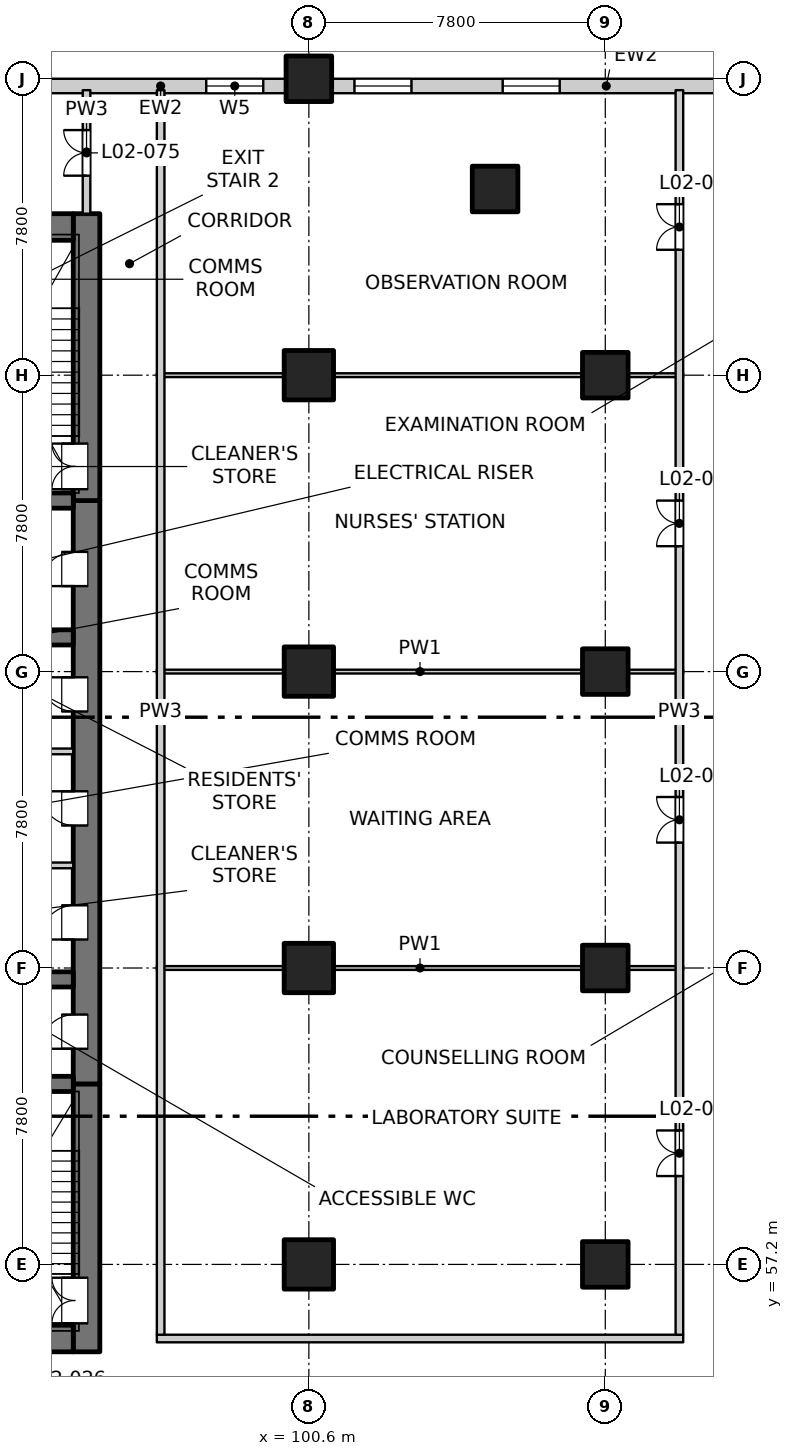
"""IFC4 building model, lengths in metres.
Left out: names, types, materials, properties, quantities, classifications, styles, units other than length and angle.
Written with IfcOpenShell. Run it as: python <this file> out.ifc"""

import sys

from ifc_helpers import new_model, si_unit, direction, frame, frame_2d, origin, origin_2d, place, context, subcontext, project, spatial, rectangle, extrude, element, fill, save


model = new_model("IFC4")
c1 = context("Model", 3, precision=1e-05, world=origin(), true_north=direction((0.0, 1.0)))
c2 = subcontext(c1, "Body", "Model", "MODEL_VIEW")
j1 = project(units=[si_unit("LENGTHUNIT", "METRE"), si_unit("PLANEANGLEUNIT", "RADIAN")], contexts=[c1])
p1 = place(None, origin())
s1 = spatial("IfcSite", under=j1, at=p1, CompositionType="ELEMENT")
p2 = place(p1, origin())
s2 = spatial("IfcBuilding", under=s1, at=p2, CompositionType="ELEMENT")
p3 = place(p2, frame((0.0, 0.0, 10.5)))
s3 = spatial("IfcBuildingStorey", under=s2, at=p3, CompositionType="ELEMENT", Elevation=10.5)
for number, where, z_axis, x_axis in (
    (1, (105.5, 85.5, -0.3), (0.0, 0.0, 1.0), (1.0, 0.0, 0.0)),
    (2, (108.4, 57.2, -0.3), (0.0, 0.0, 1.0), (1.0, 0.0, 0.0)),
    (3, (108.4, 65.0, -0.3), (0.0, 0.0, 1.0), (1.0, 0.0, 0.0)),
    (4, (108.4, 72.8, -0.3), (0.0, 0.0, 1.0), (1.0, 0.0, 0.0)),
    (5, (108.4, 80.6, -0.3), (0.0, 0.0, 1.0), (1.0, 0.0, 0.0)),
    (6, (100.6, 88.4, -0.3), (0.0, 0.0, 1.0), (1.0, 0.0, 0.0)),
):
    element("IfcColumn", number, at=place(p3, frame(where, z_axis=z_axis, x_axis=x_axis)), inside=s3, PredefinedType="COLUMN", context=c2, shape_type="SweptSolid", body=[
        extrude(rectangle(XDim=1.2, YDim=1.2, at=origin_2d()), origin(), (0.0, 0.0, 1.0), 4.45),
    ])
for number, where, z_axis, x_axis in (
    (7, (100.6, 57.2, -0.3), (0.0, 0.0, 1.0), (1.0, 0.0, 0.0)),
    (8, (100.6, 65.0, -0.3), (0.0, 0.0, 1.0), (1.0, 0.0, 0.0)),
    (9, (100.6, 72.8, -0.3), (0.0, 0.0, 1.0), (1.0, 0.0, 0.0)),
    (10, (100.6, 80.6, -0.3), (0.0, 0.0, 1.0), (1.0, 0.0, 0.0)),
):
    element("IfcColumn", number, at=place(p3, frame(where, z_axis=z_axis, x_axis=x_axis)), inside=s3, PredefinedType="COLUMN", context=c2, shape_type="SweptSolid", body=[
        extrude(rectangle(XDim=1.3, YDim=1.3, at=origin_2d()), origin(), (0.0, 0.0, 1.0), 4.45),
    ])
p4 = place(p3, frame((94.75, 54.9, -0.3), z_axis=(0.0, 0.0, 1.0), x_axis=(0.0, 1.0, 0.0)))
e11 = element("IfcWall", 11, at=p4, inside=s3, PredefinedType="SOLIDWALL", context=c2, shape_type="SweptSolid", body=[
    extrude(rectangle(XDim=7.05, YDim=0.7, at=frame_2d((3.525, 0.0))), origin(), (0.0, 0.0, 1.0), 4.45),
])
p5 = place(p4, frame((0.75, 0.0, 0.3)))
e12 = element("IfcOpeningElement", 12, at=p5, cuts=e11, PredefinedType="OPENING", context=c2, shape_type="SweptSolid", body=[
    extrude(rectangle(XDim=1.2, YDim=2.1, at=frame_2d((0.6, 1.05))), frame((0.0, 0.36, 0.0), z_axis=(0.0, -1.0, 0.0), x_axis=(1.0, 0.0, 0.0)), (0.0, 0.0, 1.0), 0.72),
])
p6 = place(p3, frame((94.75, 61.95, -0.3), z_axis=(0.0, 0.0, 1.0), x_axis=(0.0, 1.0, 0.0)))
e13 = element("IfcWall", 13, at=p6, inside=s3, PredefinedType="SOLIDWALL", context=c2, shape_type="SweptSolid", body=[
    extrude(rectangle(XDim=15.35, YDim=0.7, at=frame_2d((7.675, 0.0))), origin(), (0.0, 0.0, 1.0), 4.45),
])
p7 = place(p6, frame((0.925, 0.0, 0.3)))
e14 = element("IfcOpeningElement", 14, at=p7, cuts=e13, PredefinedType="OPENING", context=c2, shape_type="SweptSolid", body=[
    extrude(rectangle(XDim=0.9, YDim=2.1, at=frame_2d((0.45, 1.05))), frame((0.0, 0.36, 0.0), z_axis=(0.0, -1.0, 0.0), x_axis=(1.0, 0.0, 0.0)), (0.0, 0.0, 1.0), 0.72),
])
p8 = place(p6, frame((3.8, 0.0, 0.3)))
e15 = element("IfcOpeningElement", 15, at=p8, cuts=e13, PredefinedType="OPENING", context=c2, shape_type="SweptSolid", body=[
    extrude(rectangle(XDim=0.9, YDim=2.1, at=frame_2d((0.45, 1.05))), frame((0.0, 0.36, 0.0), z_axis=(0.0, -1.0, 0.0), x_axis=(1.0, 0.0, 0.0)), (0.0, 0.0, 1.0), 0.72),
])
p9 = place(p6, frame((6.8, 0.0, 0.3)))
e16 = element("IfcOpeningElement", 16, at=p9, cuts=e13, PredefinedType="OPENING", context=c2, shape_type="SweptSolid", body=[
    extrude(rectangle(XDim=0.9, YDim=2.1, at=frame_2d((0.45, 1.05))), frame((0.0, 0.36, 0.0), z_axis=(0.0, -1.0, 0.0), x_axis=(1.0, 0.0, 0.0)), (0.0, 0.0, 1.0), 0.72),
])
p10 = place(p6, frame((9.8, 0.0, 0.3)))
e17 = element("IfcOpeningElement", 17, at=p10, cuts=e13, PredefinedType="OPENING", context=c2, shape_type="SweptSolid", body=[
    extrude(rectangle(XDim=0.9, YDim=2.1, at=frame_2d((0.45, 1.05))), frame((0.0, 0.36, 0.0), z_axis=(0.0, -1.0, 0.0), x_axis=(1.0, 0.0, 0.0)), (0.0, 0.0, 1.0), 0.72),
])
p11 = place(p6, frame((13.1, 0.0, 0.3)))
e18 = element("IfcOpeningElement", 18, at=p11, cuts=e13, PredefinedType="OPENING", context=c2, shape_type="SweptSolid", body=[
    extrude(rectangle(XDim=0.9, YDim=2.1, at=frame_2d((0.45, 1.05))), frame((0.0, 0.36, 0.0), z_axis=(0.0, -1.0, 0.0), x_axis=(1.0, 0.0, 0.0)), (0.0, 0.0, 1.0), 0.72),
])
p12 = place(p3, frame((94.75, 77.3, -0.3), z_axis=(0.0, 0.0, 1.0), x_axis=(0.0, 1.0, 0.0)))
e19 = element("IfcWall", 19, at=p12, inside=s3, PredefinedType="SOLIDWALL", context=c2, shape_type="SweptSolid", body=[
    extrude(rectangle(XDim=7.55, YDim=0.7, at=frame_2d((3.775, 0.0))), origin(), (0.0, 0.0, 1.0), 4.45),
])
p13 = place(p12, frame((0.3, 0.0, 0.3)))
e20 = element("IfcOpeningElement", 20, at=p13, cuts=e19, PredefinedType="OPENING", context=c2, shape_type="SweptSolid", body=[
    extrude(rectangle(XDim=1.2, YDim=2.1, at=frame_2d((0.6, 1.05))), frame((0.0, 0.36, 0.0), z_axis=(0.0, -1.0, 0.0), x_axis=(1.0, 0.0, 0.0)), (0.0, 0.0, 1.0), 0.72),
])
p14 = place(p3, frame((75.6, 55.25, -0.3), z_axis=(0.0, 0.0, 1.0), x_axis=(1.0, 0.0, 0.0)))
e21 = element("IfcWall", 21, at=p14, inside=s3, PredefinedType="SOLIDWALL", context=c2, shape_type="SweptSolid", body=[
    extrude(rectangle(XDim=18.8, YDim=0.7, at=frame_2d((9.4, 0.0))), origin(), (0.0, 0.0, 1.0), 4.45),
])
p15 = place(p14, frame((8.65, 0.0, 0.3)))
e22 = element("IfcOpeningElement", 22, at=p15, cuts=e21, PredefinedType="OPENING", context=c2, shape_type="SweptSolid", body=[
    extrude(rectangle(XDim=1.5, YDim=2.1, at=frame_2d((0.75, 1.05))), frame((0.0, 0.36, 0.0), z_axis=(0.0, -1.0, 0.0), x_axis=(1.0, 0.0, 0.0)), (0.0, 0.0, 1.0), 0.72),
])
p16 = place(p3, frame((75.6, 84.5, -0.3), z_axis=(0.0, 0.0, 1.0), x_axis=(1.0, 0.0, 0.0)))
e23 = element("IfcWall", 23, at=p16, inside=s3, PredefinedType="SOLIDWALL", context=c2, shape_type="SweptSolid", body=[
    extrude(rectangle(XDim=18.8, YDim=0.7, at=frame_2d((9.4, 0.0))), origin(), (0.0, 0.0, 1.0), 4.45),
])
for number, where, z_axis, x_axis in (
    (24, (90.75, 61.95, -0.3), (0.0, 0.0, 1.0), (1.0, 0.0, 0.0)),
    (25, (90.75, 64.7, -0.3), (0.0, 0.0, 1.0), (1.0, 0.0, 0.0)),
    (26, (90.75, 73.7, -0.3), (0.0, 0.0, 1.0), (1.0, 0.0, 0.0)),
    (27, (90.75, 77.3, -0.3), (0.0, 0.0, 1.0), (1.0, 0.0, 0.0)),
):
    element("IfcWall", number, at=place(p3, frame(where, z_axis=z_axis, x_axis=x_axis)), inside=s3, PredefinedType="SOLIDWALL", context=c2, shape_type="SweptSolid", body=[
        extrude(rectangle(XDim=3.65, YDim=0.4, at=frame_2d((1.825, 0.0))), origin(), (0.0, 0.0, 1.0), 4.45),
    ])
p17 = place(p3, frame((93.4, 88.21, 0.0), z_axis=(0.0, 0.0, 1.0), x_axis=(1.0, 0.0, 0.0)))
e28 = element("IfcWall", 28, at=p17, inside=s3, PredefinedType="SOLIDWALL", context=c2, shape_type="SweptSolid", body=[
    extrude(rectangle(XDim=6.6, YDim=0.38, at=frame_2d((3.3, 0.0))), origin(), (0.0, 0.0, 1.0), 3.7),
])
p18 = place(p17, frame((4.5, 0.0, 0.9)))
e29 = element("IfcOpeningElement", 29, at=p18, cuts=e28, PredefinedType="OPENING", context=c2, shape_type="SweptSolid", body=[
    extrude(rectangle(XDim=1.5, YDim=1.5, at=frame_2d((0.75, 0.75))), frame((0.0, 0.2, 0.0), z_axis=(0.0, -1.0, 0.0), x_axis=(1.0, 0.0, 0.0)), (0.0, 0.0, 1.0), 0.4),
])
p19 = place(p3, frame((101.2, 88.21, 0.0), z_axis=(0.0, 0.0, 1.0), x_axis=(1.0, 0.0, 0.0)))
e30 = element("IfcWall", 30, at=p19, inside=s3, PredefinedType="SOLIDWALL", context=c2, shape_type="SweptSolid", body=[
    extrude(rectangle(XDim=14.45, YDim=0.38, at=frame_2d((7.225, 0.0))), origin(), (0.0, 0.0, 1.0), 3.7),
])
p20 = place(p19, frame((0.6, 0.0, 0.9)))
e31 = element("IfcOpeningElement", 31, at=p20, cuts=e30, PredefinedType="OPENING", context=c2, shape_type="SweptSolid", body=[
    extrude(rectangle(XDim=1.5, YDim=1.5, at=frame_2d((0.75, 0.75))), frame((0.0, 0.2, 0.0), z_axis=(0.0, -1.0, 0.0), x_axis=(1.0, 0.0, 0.0)), (0.0, 0.0, 1.0), 0.4),
])
p21 = place(p19, frame((4.5, 0.0, 0.9)))
e32 = element("IfcOpeningElement", 32, at=p21, cuts=e30, PredefinedType="OPENING", context=c2, shape_type="SweptSolid", body=[
    extrude(rectangle(XDim=1.5, YDim=1.5, at=frame_2d((0.75, 0.75))), frame((0.0, 0.2, 0.0), z_axis=(0.0, -1.0, 0.0), x_axis=(1.0, 0.0, 0.0)), (0.0, 0.0, 1.0), 0.4),
])
p22 = place(p19, frame((12.3, 0.0, 0.9)))
e33 = element("IfcOpeningElement", 33, at=p22, cuts=e30, PredefinedType="OPENING", context=c2, shape_type="SweptSolid", body=[
    extrude(rectangle(XDim=1.5, YDim=1.5, at=frame_2d((0.75, 0.75))), frame((0.0, 0.2, 0.0), z_axis=(0.0, -1.0, 0.0), x_axis=(1.0, 0.0, 0.0)), (0.0, 0.0, 1.0), 0.4),
])
p23 = place(p3, frame((96.6, 55.25, 0.0), z_axis=(0.0, 0.0, 1.0), x_axis=(1.0, 0.0, 0.0)))
e34 = element("IfcWall", 34, at=p23, inside=s3, PredefinedType="PARTITIONING", context=c2, shape_type="SweptSolid", body=[
    extrude(rectangle(XDim=13.85, YDim=0.2, at=frame_2d((6.925, 0.0))), origin(), (0.0, 0.0, 1.0), 4.15),
])
p24 = place(p3, frame((96.6, 65.0, 0.0), z_axis=(0.0, 0.0, 1.0), x_axis=(1.0, 0.0, 0.0)))
e35 = element("IfcWall", 35, at=p24, inside=s3, PredefinedType="PARTITIONING", context=c2, shape_type="SweptSolid", body=[
    extrude(rectangle(XDim=13.85, YDim=0.1, at=frame_2d((6.925, 0.0))), origin(), (0.0, 0.0, 1.0), 4.15),
])
for number, where, z_axis, x_axis in (
    (36, (90.75, 67.7, 0.0), (0.0, 0.0, 1.0), (1.0, 0.0, 0.0)),
    (37, (90.75, 70.7, 0.0), (0.0, 0.0, 1.0), (1.0, 0.0, 0.0)),
):
    element("IfcWall", number, at=place(p3, frame(where, z_axis=z_axis, x_axis=x_axis)), inside=s3, PredefinedType="PARTITIONING", context=c2, shape_type="SweptSolid", body=[
        extrude(rectangle(XDim=3.65, YDim=0.15, at=frame_2d((1.825, 0.0))), origin(), (0.0, 0.0, 1.0), 4.15),
    ])
for number, where, z_axis, x_axis in (
    (38, (96.6, 72.8, 0.0), (0.0, 0.0, 1.0), (1.0, 0.0, 0.0)),
    (39, (96.6, 80.6, 0.0), (0.0, 0.0, 1.0), (1.0, 0.0, 0.0)),
):
    element("IfcWall", number, at=place(p3, frame(where, z_axis=z_axis, x_axis=x_axis)), inside=s3, PredefinedType="PARTITIONING", context=c2, shape_type="SweptSolid", body=[
        extrude(rectangle(XDim=13.85, YDim=0.1, at=frame_2d((6.925, 0.0))), origin(), (0.0, 0.0, 1.0), 4.15),
    ])
p25 = place(p3, frame((94.75, 84.85, 0.0), z_axis=(0.0, 0.0, 1.0), x_axis=(0.0, 1.0, 0.0)))
e40 = element("IfcWall", 40, at=p25, inside=s3, PredefinedType="PARTITIONING", context=c2, shape_type="SweptSolid", body=[
    extrude(rectangle(XDim=3.25, YDim=0.2, at=frame_2d((1.625, 0.0))), origin(), (0.0, 0.0, 1.0), 4.15),
])
p26 = place(p25, frame((1.0, 0.0, 0.0)))
e41 = element("IfcOpeningElement", 41, at=p26, cuts=e40, PredefinedType="OPENING", context=c2, shape_type="SweptSolid", body=[
    extrude(rectangle(XDim=1.2, YDim=2.1, at=frame_2d((0.6, 1.05))), frame((0.0, 0.11, 0.0), z_axis=(0.0, -1.0, 0.0), x_axis=(1.0, 0.0, 0.0)), (0.0, 0.0, 1.0), 0.22),
])
p27 = place(p3, frame((96.7, 55.35, 0.0), z_axis=(0.0, 0.0, 1.0), x_axis=(0.0, 1.0, 0.0)))
e42 = element("IfcWall", 42, at=p27, inside=s3, PredefinedType="PARTITIONING", context=c2, shape_type="SweptSolid", body=[
    extrude(rectangle(XDim=32.75, YDim=0.2, at=frame_2d((16.375, 0.0))), origin(), (0.0, 0.0, 1.0), 4.15),
])
p28 = place(p3, frame((110.35, 55.35, 0.0), z_axis=(0.0, 0.0, 1.0), x_axis=(0.0, 1.0, 0.0)))
e43 = element("IfcWall", 43, at=p28, inside=s3, PredefinedType="PARTITIONING", context=c2, shape_type="SweptSolid", body=[
    extrude(rectangle(XDim=32.75, YDim=0.2, at=frame_2d((16.375, 0.0))), origin(), (0.0, 0.0, 1.0), 4.15),
])
p29 = place(p28, frame((4.175, 0.0, 0.0)))
e44 = element("IfcOpeningElement", 44, at=p29, cuts=e43, PredefinedType="OPENING", context=c2, shape_type="SweptSolid", body=[
    extrude(rectangle(XDim=1.2, YDim=2.1, at=frame_2d((0.6, 1.05))), frame((0.0, 0.11, 0.0), z_axis=(0.0, -1.0, 0.0), x_axis=(1.0, 0.0, 0.0)), (0.0, 0.0, 1.0), 0.22),
])
p30 = place(p28, frame((12.95, 0.0, 0.0)))
e45 = element("IfcOpeningElement", 45, at=p30, cuts=e43, PredefinedType="OPENING", context=c2, shape_type="SweptSolid", body=[
    extrude(rectangle(XDim=1.2, YDim=2.1, at=frame_2d((0.6, 1.05))), frame((0.0, 0.11, 0.0), z_axis=(0.0, -1.0, 0.0), x_axis=(1.0, 0.0, 0.0)), (0.0, 0.0, 1.0), 0.22),
])
p31 = place(p28, frame((20.75, 0.0, 0.0)))
e46 = element("IfcOpeningElement", 46, at=p31, cuts=e43, PredefinedType="OPENING", context=c2, shape_type="SweptSolid", body=[
    extrude(rectangle(XDim=1.2, YDim=2.1, at=frame_2d((0.6, 1.05))), frame((0.0, 0.11, 0.0), z_axis=(0.0, -1.0, 0.0), x_axis=(1.0, 0.0, 0.0)), (0.0, 0.0, 1.0), 0.22),
])
p32 = place(p28, frame((28.55, 0.0, 0.0)))
e47 = element("IfcOpeningElement", 47, at=p32, cuts=e43, PredefinedType="OPENING", context=c2, shape_type="SweptSolid", body=[
    extrude(rectangle(XDim=1.2, YDim=2.1, at=frame_2d((0.6, 1.05))), frame((0.0, 0.11, 0.0), z_axis=(0.0, -1.0, 0.0), x_axis=(1.0, 0.0, 0.0)), (0.0, 0.0, 1.0), 0.22),
])
p33 = place(p18, origin())
e48 = element("IfcWindow", 48, at=p33, inside=s3, PartitioningType="SINGLE_PANEL", PredefinedType="WINDOW", context=c2, shape_type="SweptSolid", body=[
    extrude(rectangle(XDim=1.5, YDim=1.5, at=frame_2d((0.75, 0.75))), frame((0.0, 0.03, 0.0), z_axis=(0.0, -1.0, 0.0), x_axis=(1.0, 0.0, 0.0)), (0.0, 0.0, 1.0), 0.06),
])
fill(e29, e48)
p34 = place(p20, origin())
e49 = element("IfcWindow", 49, at=p34, inside=s3, PartitioningType="SINGLE_PANEL", PredefinedType="WINDOW", context=c2, shape_type="SweptSolid", body=[
    extrude(rectangle(XDim=1.5, YDim=1.5, at=frame_2d((0.75, 0.75))), frame((0.0, 0.03, 0.0), z_axis=(0.0, -1.0, 0.0), x_axis=(1.0, 0.0, 0.0)), (0.0, 0.0, 1.0), 0.06),
])
fill(e31, e49)
p35 = place(p21, origin())
e50 = element("IfcWindow", 50, at=p35, inside=s3, PartitioningType="SINGLE_PANEL", PredefinedType="WINDOW", context=c2, shape_type="SweptSolid", body=[
    extrude(rectangle(XDim=1.5, YDim=1.5, at=frame_2d((0.75, 0.75))), frame((0.0, 0.03, 0.0), z_axis=(0.0, -1.0, 0.0), x_axis=(1.0, 0.0, 0.0)), (0.0, 0.0, 1.0), 0.06),
])
fill(e32, e50)
p36 = place(p5, origin())
e51 = element("IfcDoor", 51, at=p36, inside=s3, OperationType="DOUBLE_DOOR_SINGLE_SWING", PredefinedType="DOOR", context=c2, shape_type="SweptSolid", body=[
    extrude(rectangle(XDim=1.2, YDim=2.1, at=frame_2d((0.6, 1.05))), frame((0.0, 0.335, 0.0), z_axis=(0.0, -1.0, 0.0), x_axis=(1.0, 0.0, 0.0)), (0.0, 0.0, 1.0), 0.05),
])
fill(e12, e51)
p37 = place(p29, origin())
e52 = element("IfcDoor", 52, at=p37, inside=s3, OperationType="DOUBLE_DOOR_SINGLE_SWING", PredefinedType="DOOR", context=c2, shape_type="SweptSolid", body=[
    extrude(rectangle(XDim=1.2, YDim=2.1, at=frame_2d((0.6, 1.05))), frame((0.0, 0.025, 0.0), z_axis=(0.0, -1.0, 0.0), x_axis=(1.0, 0.0, 0.0)), (0.0, 0.0, 1.0), 0.05),
])
fill(e44, e52)
p38 = place(p7, origin())
e53 = element("IfcDoor", 53, at=p38, inside=s3, OperationType="SINGLE_SWING_LEFT", PredefinedType="DOOR", context=c2, shape_type="SweptSolid", body=[
    extrude(rectangle(XDim=0.9, YDim=2.1, at=frame_2d((0.45, 1.05))), frame((0.0, 0.335, 0.0), z_axis=(0.0, -1.0, 0.0), x_axis=(1.0, 0.0, 0.0)), (0.0, 0.0, 1.0), 0.05),
])
fill(e14, e53)
p39 = place(p8, origin())
e54 = element("IfcDoor", 54, at=p39, inside=s3, OperationType="SINGLE_SWING_LEFT", PredefinedType="DOOR", context=c2, shape_type="SweptSolid", body=[
    extrude(rectangle(XDim=0.9, YDim=2.1, at=frame_2d((0.45, 1.05))), frame((0.0, 0.335, 0.0), z_axis=(0.0, -1.0, 0.0), x_axis=(1.0, 0.0, 0.0)), (0.0, 0.0, 1.0), 0.05),
])
fill(e15, e54)
p40 = place(p30, origin())
e55 = element("IfcDoor", 55, at=p40, inside=s3, OperationType="DOUBLE_DOOR_SINGLE_SWING", PredefinedType="DOOR", context=c2, shape_type="SweptSolid", body=[
    extrude(rectangle(XDim=1.2, YDim=2.1, at=frame_2d((0.6, 1.05))), frame((0.0, 0.025, 0.0), z_axis=(0.0, -1.0, 0.0), x_axis=(1.0, 0.0, 0.0)), (0.0, 0.0, 1.0), 0.05),
])
fill(e45, e55)
p41 = place(p9, origin())
e56 = element("IfcDoor", 56, at=p41, inside=s3, OperationType="SINGLE_SWING_RIGHT", PredefinedType="DOOR", context=c2, shape_type="SweptSolid", body=[
    extrude(rectangle(XDim=0.9, YDim=2.1, at=frame_2d((0.45, 1.05))), frame((0.0, 0.335, 0.0), z_axis=(0.0, -1.0, 0.0), x_axis=(1.0, 0.0, 0.0)), (0.0, 0.0, 1.0), 0.05),
])
fill(e16, e56)
p42 = place(p10, origin())
e57 = element("IfcDoor", 57, at=p42, inside=s3, OperationType="SINGLE_SWING_RIGHT", PredefinedType="DOOR", context=c2, shape_type="SweptSolid", body=[
    extrude(rectangle(XDim=0.9, YDim=2.1, at=frame_2d((0.45, 1.05))), frame((0.0, 0.335, 0.0), z_axis=(0.0, -1.0, 0.0), x_axis=(1.0, 0.0, 0.0)), (0.0, 0.0, 1.0), 0.05),
])
fill(e17, e57)
p43 = place(p11, origin())
e58 = element("IfcDoor", 58, at=p43, inside=s3, OperationType="SINGLE_SWING_LEFT", PredefinedType="DOOR", context=c2, shape_type="SweptSolid", body=[
    extrude(rectangle(XDim=0.9, YDim=2.1, at=frame_2d((0.45, 1.05))), frame((0.0, 0.335, 0.0), z_axis=(0.0, -1.0, 0.0), x_axis=(1.0, 0.0, 0.0)), (0.0, 0.0, 1.0), 0.05),
])
fill(e18, e58)
p44 = place(p31, origin())
e59 = element("IfcDoor", 59, at=p44, inside=s3, OperationType="DOUBLE_DOOR_SINGLE_SWING", PredefinedType="DOOR", context=c2, shape_type="SweptSolid", body=[
    extrude(rectangle(XDim=1.2, YDim=2.1, at=frame_2d((0.6, 1.05))), frame((0.0, 0.025, 0.0), z_axis=(0.0, -1.0, 0.0), x_axis=(1.0, 0.0, 0.0)), (0.0, 0.0, 1.0), 0.05),
])
fill(e46, e59)
p45 = place(p13, origin())
e60 = element("IfcDoor", 60, at=p45, inside=s3, OperationType="DOUBLE_DOOR_SINGLE_SWING", PredefinedType="DOOR", context=c2, shape_type="SweptSolid", body=[
    extrude(rectangle(XDim=1.2, YDim=2.1, at=frame_2d((0.6, 1.05))), frame((0.0, 0.335, 0.0), z_axis=(0.0, -1.0, 0.0), x_axis=(1.0, 0.0, 0.0)), (0.0, 0.0, 1.0), 0.05),
])
fill(e20, e60)
p46 = place(p32, origin())
e61 = element("IfcDoor", 61, at=p46, inside=s3, OperationType="DOUBLE_DOOR_SINGLE_SWING", PredefinedType="DOOR", context=c2, shape_type="SweptSolid", body=[
    extrude(rectangle(XDim=1.2, YDim=2.1, at=frame_2d((0.6, 1.05))), frame((0.0, 0.025, 0.0), z_axis=(0.0, -1.0, 0.0), x_axis=(1.0, 0.0, 0.0)), (0.0, 0.0, 1.0), 0.05),
])
fill(e47, e61)
p47 = place(p26, origin())
e62 = element("IfcDoor", 62, at=p47, inside=s3, OperationType="DOUBLE_DOOR_SINGLE_SWING", PredefinedType="DOOR", context=c2, shape_type="SweptSolid", body=[
    extrude(rectangle(XDim=1.2, YDim=2.1, at=frame_2d((0.6, 1.05))), frame((0.0, 0.025, 0.0), z_axis=(0.0, -1.0, 0.0), x_axis=(1.0, 0.0, 0.0)), (0.0, 0.0, 1.0), 0.05),
])
fill(e41, e62)
save(model, sys.argv[1])
